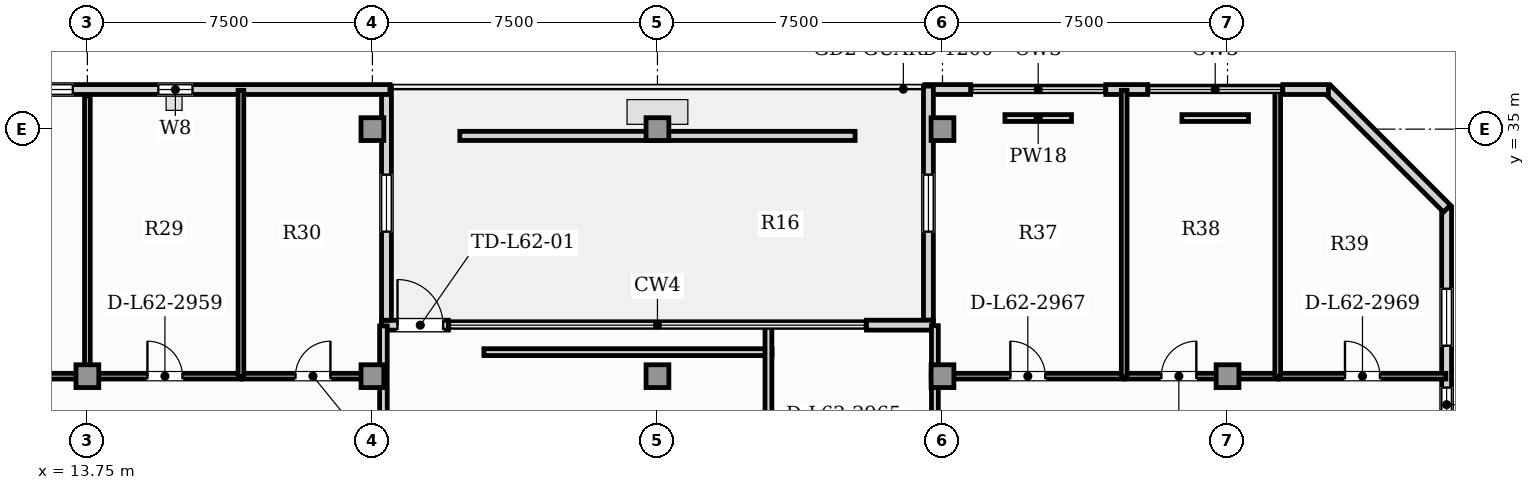
"""IFC4 building model, lengths in metres.
Left out: names, types, materials, properties, quantities, classifications, styles, units other than length and angle.
Written with IfcOpenShell. Run it as: python <this file> out.ifc"""

import sys

from ifc_helpers import new_model, si_unit, direction, frame, frame_2d, origin, origin_2d, place, context, subcontext, project, spatial, rectangle, extrude, element, fill, save


model = new_model("IFC4")
c1 = context("Model", 3, precision=1e-05, world=origin(), true_north=direction((0.0, 1.0)))
c2 = subcontext(c1, "Body", "Model", "MODEL_VIEW")
j1 = project(units=[si_unit("LENGTHUNIT", "METRE"), si_unit("PLANEANGLEUNIT", "RADIAN")], contexts=[c1])
p1 = place(None, origin())
s1 = spatial("IfcSite", under=j1, at=p1, CompositionType="ELEMENT")
p2 = place(p1, origin())
s2 = spatial("IfcBuilding", under=s1, at=p2, CompositionType="ELEMENT")
p3 = place(p2, frame((0.0, 0.0, 251.7)))
s3 = spatial("IfcBuildingStorey", under=s2, at=p3, CompositionType="ELEMENT", Elevation=251.7)
for number, where, z_axis, x_axis in (
    (1, (13.75, 28.5, 0.0), (0.0, 0.0, 1.0), (1.0, 0.0, 0.0)),
    (2, (21.25, 28.5, 0.0), (0.0, 0.0, 1.0), (1.0, 0.0, 0.0)),
    (3, (28.75, 28.5, 0.0), (0.0, 0.0, 1.0), (1.0, 0.0, 0.0)),
    (4, (36.25, 28.5, 0.0), (0.0, 0.0, 1.0), (1.0, 0.0, 0.0)),
    (5, (43.75, 28.5, 0.0), (0.0, 0.0, 1.0), (1.0, 0.0, 0.0)),
    (6, (21.25, 35.0, 0.0), (0.0, 0.0, 1.0), (1.0, 0.0, 0.0)),
    (7, (28.75, 35.0, 0.0), (0.0, 0.0, 1.0), (1.0, 0.0, 0.0)),
    (8, (36.25, 35.0, 0.0), (0.0, 0.0, 1.0), (1.0, 0.0, 0.0)),
):
    element("IfcColumn", number, at=place(p3, frame(where, z_axis=z_axis, x_axis=x_axis)), inside=s3, PredefinedType="COLUMN", context=c2, shape_type="SweptSolid", body=[
        extrude(rectangle(XDim=0.6, YDim=0.6, at=origin_2d()), origin(), (0.0, 0.0, 1.0), 5.05),
    ])
p4 = place(p3, frame((49.514, 3.24, 0.0), z_axis=(0.0, 0.0, 1.0), x_axis=(0.0, 1.0, 0.0)))
e9 = element("IfcWall", 9, at=p4, inside=s3, PredefinedType="SOLIDWALL", context=c2, shape_type="SweptSolid", body=[
    extrude(rectangle(XDim=29.692, YDim=0.26, at=frame_2d((14.846, 0.0))), origin(), (0.0, 0.0, 1.0), 4.85),
])
p5 = place(p4, frame((24.06, 0.0, 0.95)))
e10 = element("IfcOpeningElement", 10, at=p5, cuts=e9, PredefinedType="OPENING", context=c2, shape_type="SweptSolid", body=[
    extrude(rectangle(XDim=0.9, YDim=1.5, at=frame_2d((0.45, 0.75))), frame((0.0, 0.14, 0.0), z_axis=(0.0, -1.0, 0.0), x_axis=(1.0, 0.0, 0.0)), (0.0, 0.0, 1.0), 0.28),
])
p6 = place(p4, frame((10.25, 0.0, 0.9)))
e11 = element("IfcOpeningElement", 11, at=p6, cuts=e9, PredefinedType="OPENING", context=c2, shape_type="SweptSolid", body=[
    extrude(rectangle(XDim=1.5, YDim=1.95, at=frame_2d((0.75, 0.975))), frame((0.0, 0.14, 0.0), z_axis=(0.0, -1.0, 0.0), x_axis=(1.0, 0.0, 0.0)), (0.0, 0.0, 1.0), 0.28),
])
p7 = place(p4, frame((17.315, 0.0, 0.9)))
e12 = element("IfcOpeningElement", 12, at=p7, cuts=e9, PredefinedType="OPENING", context=c2, shape_type="SweptSolid", body=[
    extrude(rectangle(XDim=1.5, YDim=1.95, at=frame_2d((0.75, 0.975))), frame((0.0, 0.14, 0.0), z_axis=(0.0, -1.0, 0.0), x_axis=(1.0, 0.0, 0.0)), (0.0, 0.0, 1.0), 0.28),
])
p8 = place(p4, frame((26.061, 0.0, 0.9)))
e13 = element("IfcOpeningElement", 13, at=p8, cuts=e9, PredefinedType="OPENING", context=c2, shape_type="SweptSolid", body=[
    extrude(rectangle(XDim=1.5, YDim=1.95, at=frame_2d((0.75, 0.975))), frame((0.0, 0.14, 0.0), z_axis=(0.0, -1.0, 0.0), x_axis=(1.0, 0.0, 0.0)), (0.0, 0.0, 1.0), 0.28),
])
p9 = place(p3, frame((49.524, 32.908, 0.0), z_axis=(0.0, 0.0, 1.0), x_axis=(-0.707106781187, 0.707106781187, 0.0)))
e14 = element("IfcWall", 14, at=p9, inside=s3, PredefinedType="SOLIDWALL", context=c2, shape_type="SweptSolid", body=[
    extrude(rectangle(XDim=4.446, YDim=0.26, at=frame_2d((2.223, 0.0))), origin(), (0.0, 0.0, 1.0), 4.85),
])
p10 = place(p3, frame((46.405, 36.042, 0.0), z_axis=(0.0, 0.0, 1.0), x_axis=(-1.0, 0.0, 0.0)))
e15 = element("IfcWall", 15, at=p10, inside=s3, PredefinedType="SOLIDWALL", context=c2, shape_type="SweptSolid", body=[
    extrude(rectangle(XDim=1.2, YDim=0.26, at=frame_2d((0.6, 0.0))), origin(), (0.0, 0.0, 1.0), 4.85),
])
p11 = place(p3, frame((41.647, 36.042, 0.0), z_axis=(0.0, 0.0, 1.0), x_axis=(-1.0, 0.0, 0.0)))
e16 = element("IfcWall", 16, at=p11, inside=s3, PredefinedType="SOLIDWALL", context=c2, shape_type="SweptSolid", body=[
    extrude(rectangle(XDim=1.1, YDim=0.26, at=frame_2d((0.55, 0.0))), origin(), (0.0, 0.0, 1.0), 4.85),
])
p12 = place(p3, frame((36.99, 36.042, 0.0), z_axis=(0.0, 0.0, 1.0), x_axis=(-1.0, 0.0, 0.0)))
e17 = element("IfcWall", 17, at=p12, inside=s3, PredefinedType="SOLIDWALL", context=c2, shape_type="SweptSolid", body=[
    extrude(rectangle(XDim=1.2, YDim=0.26, at=frame_2d((0.6, 0.0))), origin(), (0.0, 0.0, 1.0), 4.85),
])
p13 = place(p3, frame((35.88, 36.132, 0.0), z_axis=(0.0, 0.0, 1.0), x_axis=(0.0, -1.0, 0.0)))
e18 = element("IfcWall", 18, at=p13, inside=s3, PredefinedType="SOLIDWALL", context=c2, shape_type="SweptSolid", body=[
    extrude(rectangle(XDim=6.16, YDim=0.26, at=frame_2d((3.08, 0.0))), origin(), (0.0, 0.0, 1.0), 4.85),
])
p14 = place(p13, frame((2.33, 0.0, 0.9)))
e19 = element("IfcOpeningElement", 19, at=p14, cuts=e18, PredefinedType="OPENING", context=c2, shape_type="SweptSolid", body=[
    extrude(rectangle(XDim=1.5, YDim=1.95, at=frame_2d((0.75, 0.975))), frame((0.0, 0.14, 0.0), z_axis=(0.0, -1.0, 0.0), x_axis=(1.0, 0.0, 0.0)), (0.0, 0.0, 1.0), 0.28),
])
p15 = place(p3, frame((21.49, 29.842, 0.0), z_axis=(0.0, 0.0, 1.0), x_axis=(1.0, 0.0, 0.0)))
e20 = element("IfcWall", 20, at=p15, inside=s3, PredefinedType="SOLIDWALL", context=c2, shape_type="SweptSolid", body=[
    extrude(rectangle(XDim=1.76, YDim=0.26, at=frame_2d((0.88, 0.0))), origin(), (0.0, 0.0, 1.0), 4.85),
])
p16 = place(p15, frame((0.42, 0.0, 0.0)))
e21 = element("IfcOpeningElement", 21, at=p16, cuts=e20, PredefinedType="OPENING", context=c2, shape_type="SweptSolid", body=[
    extrude(rectangle(XDim=1.2, YDim=2.2, at=frame_2d((0.6, 1.1))), frame((0.0, 0.14, 0.0), z_axis=(0.0, -1.0, 0.0), x_axis=(1.0, 0.0, 0.0)), (0.0, 0.0, 1.0), 0.28),
])
p17 = place(p3, frame((34.25, 29.842, 0.0), z_axis=(0.0, 0.0, 1.0), x_axis=(1.0, 0.0, 0.0)))
e22 = element("IfcWall", 22, at=p17, inside=s3, PredefinedType="SOLIDWALL", context=c2, shape_type="SweptSolid", body=[
    extrude(rectangle(XDim=1.76, YDim=0.26, at=frame_2d((0.88, 0.0))), origin(), (0.0, 0.0, 1.0), 4.85),
])
p18 = place(p3, frame((21.62, 29.972, 0.0), z_axis=(0.0, 0.0, 1.0), x_axis=(0.0, 1.0, 0.0)))
e23 = element("IfcWall", 23, at=p18, inside=s3, PredefinedType="SOLIDWALL", context=c2, shape_type="SweptSolid", body=[
    extrude(rectangle(XDim=6.16, YDim=0.26, at=frame_2d((3.08, 0.0))), origin(), (0.0, 0.0, 1.0), 4.85),
])
p19 = place(p18, frame((2.33, 0.0, 0.9)))
e24 = element("IfcOpeningElement", 24, at=p19, cuts=e23, PredefinedType="OPENING", context=c2, shape_type="SweptSolid", body=[
    extrude(rectangle(XDim=1.5, YDim=1.95, at=frame_2d((0.75, 0.975))), frame((0.0, 0.14, 0.0), z_axis=(0.0, -1.0, 0.0), x_axis=(1.0, 0.0, 0.0)), (0.0, 0.0, 1.0), 0.28),
])
p20 = place(p3, frame((21.71, 36.042, 0.0), z_axis=(0.0, 0.0, 1.0), x_axis=(-1.0, 0.0, 0.0)))
e25 = element("IfcWall", 25, at=p20, inside=s3, PredefinedType="SOLIDWALL", context=c2, shape_type="SweptSolid", body=[
    extrude(rectangle(XDim=10.615, YDim=0.26, at=frame_2d((5.307, 0.0))), origin(), (0.0, 0.0, 1.0), 4.85),
])
p21 = place(p20, frame((8.344, 0.0, 0.9)))
e26 = element("IfcOpeningElement", 26, at=p21, cuts=e25, PredefinedType="OPENING", context=c2, shape_type="SweptSolid", body=[
    extrude(rectangle(XDim=1.5, YDim=1.95, at=frame_2d((0.75, 0.975))), frame((0.0, 0.14, 0.0), z_axis=(0.0, -1.0, 0.0), x_axis=(1.0, 0.0, 0.0)), (0.0, 0.0, 1.0), 0.28),
])
p22 = place(p20, frame((5.194, 0.0, 0.9)))
e27 = element("IfcOpeningElement", 27, at=p22, cuts=e25, PredefinedType="OPENING", context=c2, shape_type="SweptSolid", body=[
    extrude(rectangle(XDim=0.9, YDim=1.4, at=frame_2d((0.45, 0.7))), frame((0.0, 0.14, 0.0), z_axis=(0.0, -1.0, 0.0), x_axis=(1.0, 0.0, 0.0)), (0.0, 0.0, 1.0), 0.28),
])
p23 = place(p3, frame((23.55, 34.822, 0.0), z_axis=(0.0, 0.0, 1.0), x_axis=(1.0, 0.0, 0.0)))
e28 = element("IfcWall", 28, at=p23, inside=s3, PredefinedType="PARAPET", context=c2, shape_type="SweptSolid", body=[
    extrude(rectangle(XDim=10.4, YDim=0.24, at=frame_2d((5.2, 0.0))), origin(), (0.0, 0.0, 1.0), 0.55),
])
p24 = place(p3, frame((21.54, 26.995, 0.0), z_axis=(0.0, 0.0, 1.0), x_axis=(0.0, 1.0, 0.0)))
e29 = element("IfcWall", 29, at=p24, inside=s3, PredefinedType="PARTITIONING", context=c2, shape_type="SweptSolid", body=[
    extrude(rectangle(XDim=2.827, YDim=0.2, at=frame_2d((1.414, 0.0))), origin(), (0.0, 0.0, 1.0), 4.85),
])
p25 = place(p3, frame((8.005, 28.5, 0.0), z_axis=(0.0, 0.0, 1.0), x_axis=(1.0, 0.0, 0.0)))
e30 = element("IfcWall", 30, at=p25, inside=s3, PredefinedType="PARTITIONING", context=c2, shape_type="SweptSolid", body=[
    extrude(rectangle(XDim=5.75, YDim=0.15, at=frame_2d((2.875, 0.0))), origin(), (0.0, 0.0, 1.0), 4.85),
])
p26 = place(p25, frame((2.415, 0.0, 0.0)))
e31 = element("IfcOpeningElement", 31, at=p26, cuts=e30, PredefinedType="OPENING", context=c2, shape_type="SweptSolid", body=[
    extrude(rectangle(XDim=0.92, YDim=2.1, at=frame_2d((0.46, 1.05))), frame((0.0, 0.085, 0.0), z_axis=(0.0, -1.0, 0.0), x_axis=(1.0, 0.0, 0.0)), (0.0, 0.0, 1.0), 0.17),
])
p27 = place(p3, frame((13.785, 28.5, 0.0), z_axis=(0.0, 0.0, 1.0), x_axis=(1.0, 0.0, 0.0)))
e32 = element("IfcWall", 32, at=p27, inside=s3, PredefinedType="PARTITIONING", context=c2, shape_type="SweptSolid", body=[
    extrude(rectangle(XDim=4.011, YDim=0.15, at=frame_2d((2.005, 0.0))), origin(), (0.0, 0.0, 1.0), 4.306),
])
p28 = place(p27, frame((1.545, 0.0, 0.0)))
e33 = element("IfcOpeningElement", 33, at=p28, cuts=e32, PredefinedType="OPENING", context=c2, shape_type="SweptSolid", body=[
    extrude(rectangle(XDim=0.92, YDim=2.1, at=frame_2d((0.46, 1.05))), frame((0.0, 0.085, 0.0), z_axis=(0.0, -1.0, 0.0), x_axis=(1.0, 0.0, 0.0)), (0.0, 0.0, 1.0), 0.17),
])
p29 = place(p3, frame((17.826, 28.5, 0.0), z_axis=(0.0, 0.0, 1.0), x_axis=(1.0, 0.0, 0.0)))
e34 = element("IfcWall", 34, at=p29, inside=s3, PredefinedType="PARTITIONING", context=c2, shape_type="SweptSolid", body=[
    extrude(rectangle(XDim=3.719, YDim=0.15, at=frame_2d((1.86, 0.0))), origin(), (0.0, 0.0, 1.0), 4.306),
])
p30 = place(p29, frame((1.4, 0.0, 0.0)))
e35 = element("IfcOpeningElement", 35, at=p30, cuts=e34, PredefinedType="OPENING", context=c2, shape_type="SweptSolid", body=[
    extrude(rectangle(XDim=0.92, YDim=2.1, at=frame_2d((0.46, 1.05))), frame((0.0, 0.085, 0.0), z_axis=(0.0, -1.0, 0.0), x_axis=(1.0, 0.0, 0.0)), (0.0, 0.0, 1.0), 0.17),
])
p31 = place(p3, frame((13.75, 28.495, 0.0), z_axis=(0.0, 0.0, 1.0), x_axis=(0.0, 1.0, 0.0)))
e36 = element("IfcWall", 36, at=p31, inside=s3, PredefinedType="PARTITIONING", context=c2, shape_type="SweptSolid", body=[
    extrude(rectangle(XDim=7.378, YDim=0.15, at=frame_2d((3.689, 0.0))), origin(), (0.0, 0.0, 1.0), 4.85),
])
p32 = place(p3, frame((17.791, 28.495, 0.0), z_axis=(0.0, 0.0, 1.0), x_axis=(0.0, 1.0, 0.0)))
e37 = element("IfcWall", 37, at=p32, inside=s3, PredefinedType="PARTITIONING", context=c2, shape_type="SweptSolid", body=[
    extrude(rectangle(XDim=7.527, YDim=0.15, at=frame_2d((3.764, 0.0))), origin(), (0.0, 0.0, 1.0), 4.85),
])
p33 = place(p3, frame((35.955, 28.5, 0.0), z_axis=(0.0, 0.0, 1.0), x_axis=(1.0, 0.0, 0.0)))
e38 = element("IfcWall", 38, at=p33, inside=s3, PredefinedType="PARTITIONING", context=c2, shape_type="SweptSolid", body=[
    extrude(rectangle(XDim=5.08, YDim=0.15, at=frame_2d((2.54, 0.0))), origin(), (0.0, 0.0, 1.0), 4.306),
])
p34 = place(p33, frame((2.08, 0.0, 0.0)))
e39 = element("IfcOpeningElement", 39, at=p34, cuts=e38, PredefinedType="OPENING", context=c2, shape_type="SweptSolid", body=[
    extrude(rectangle(XDim=0.92, YDim=2.1, at=frame_2d((0.46, 1.05))), frame((0.0, 0.085, 0.0), z_axis=(0.0, -1.0, 0.0), x_axis=(1.0, 0.0, 0.0)), (0.0, 0.0, 1.0), 0.17),
])
p35 = place(p3, frame((41.065, 28.5, 0.0), z_axis=(0.0, 0.0, 1.0), x_axis=(1.0, 0.0, 0.0)))
e40 = element("IfcWall", 40, at=p35, inside=s3, PredefinedType="PARTITIONING", context=c2, shape_type="SweptSolid", body=[
    extrude(rectangle(XDim=4.011, YDim=0.15, at=frame_2d((2.005, 0.0))), origin(), (0.0, 0.0, 1.0), 4.306),
])
p36 = place(p35, frame((0.944, 0.0, 0.0)))
e41 = element("IfcOpeningElement", 41, at=p36, cuts=e40, PredefinedType="OPENING", context=c2, shape_type="SweptSolid", body=[
    extrude(rectangle(XDim=0.92, YDim=2.1, at=frame_2d((0.46, 1.05))), frame((0.0, 0.085, 0.0), z_axis=(0.0, -1.0, 0.0), x_axis=(1.0, 0.0, 0.0)), (0.0, 0.0, 1.0), 0.17),
])
p37 = place(p3, frame((45.106, 28.5, 0.0), z_axis=(0.0, 0.0, 1.0), x_axis=(1.0, 0.0, 0.0)))
e42 = element("IfcWall", 42, at=p37, inside=s3, PredefinedType="PARTITIONING", context=c2, shape_type="SweptSolid", body=[
    extrude(rectangle(XDim=4.389, YDim=0.15, at=frame_2d((2.194, 0.0))), origin(), (0.0, 0.0, 1.0), 4.85),
])
p38 = place(p37, frame((1.734, 0.0, 0.0)))
e43 = element("IfcOpeningElement", 43, at=p38, cuts=e42, PredefinedType="OPENING", context=c2, shape_type="SweptSolid", body=[
    extrude(rectangle(XDim=0.92, YDim=2.1, at=frame_2d((0.46, 1.05))), frame((0.0, 0.085, 0.0), z_axis=(0.0, -1.0, 0.0), x_axis=(1.0, 0.0, 0.0)), (0.0, 0.0, 1.0), 0.17),
])
p39 = place(p3, frame((41.03, 28.495, 0.0), z_axis=(0.0, 0.0, 1.0), x_axis=(0.0, 1.0, 0.0)))
e44 = element("IfcWall", 44, at=p39, inside=s3, PredefinedType="PARTITIONING", context=c2, shape_type="SweptSolid", body=[
    extrude(rectangle(XDim=7.527, YDim=0.15, at=frame_2d((3.764, 0.0))), origin(), (0.0, 0.0, 1.0), 4.85),
])
p40 = place(p3, frame((45.071, 28.495, 0.0), z_axis=(0.0, 0.0, 1.0), x_axis=(0.0, 1.0, 0.0)))
e45 = element("IfcWall", 45, at=p40, inside=s3, PredefinedType="PARTITIONING", context=c2, shape_type="SweptSolid", body=[
    extrude(rectangle(XDim=7.553, YDim=0.15, at=frame_2d((3.776, 0.0))), origin(), (0.0, 0.0, 1.0), 4.85),
])
p41 = place(p3, frame((24.183, 29.132, 0.0), z_axis=(0.0, 0.0, 1.0), x_axis=(1.0, 0.0, 0.0)))
e46 = element("IfcWall", 46, at=p41, inside=s3, PredefinedType="PARTITIONING", context=c2, shape_type="SweptSolid", body=[
    extrude(rectangle(XDim=7.582, YDim=0.18, at=frame_2d((3.791, 0.0))), origin(), (0.0, 0.0, 1.0), 4.85),
])
p42 = place(p3, frame((31.67, 29.824, 0.0), z_axis=(0.0, 0.0, 1.0), x_axis=(0.0, -1.0, 0.0)))
e47 = element("IfcWall", 47, at=p42, inside=s3, PredefinedType="PARTITIONING", context=c2, shape_type="SweptSolid", body=[
    extrude(rectangle(XDim=11.995, YDim=0.18, at=frame_2d((5.998, 0.0))), origin(), (0.0, 0.0, 1.0), 4.85),
])
p43 = place(p3, frame((36.05, 27.325, 0.0), z_axis=(0.0, 0.0, 1.0), x_axis=(0.0, 1.0, 0.0)))
e48 = element("IfcWall", 48, at=p43, inside=s3, PredefinedType="PARTITIONING", context=c2, shape_type="SweptSolid", body=[
    extrude(rectangle(XDim=2.504, YDim=0.18, at=frame_2d((1.252, 0.0))), origin(), (0.0, 0.0, 1.0), 4.85),
])
for number, where, z_axis, x_axis in (
    (49, (37.893, 35.292, 0.0), (0.0, 0.0, 1.0), (1.0, 0.0, 0.0)),
    (50, (42.55, 35.292, 0.0), (0.0, 0.0, 1.0), (1.0, 0.0, 0.0)),
):
    element("IfcWall", number, at=place(p3, frame(where, z_axis=z_axis, x_axis=x_axis)), inside=s3, PredefinedType="PARTITIONING", context=c2, shape_type="SweptSolid", body=[
        extrude(rectangle(XDim=1.751, YDim=0.18, at=frame_2d((0.875, 0.0))), origin(), (0.0, 0.0, 1.0), 4.85),
    ])
p44 = place(p16, origin())
e51 = element("IfcDoor", 51, at=p44, inside=s3, OperationType="SINGLE_SWING_LEFT", PredefinedType="DOOR", context=c2, shape_type="SweptSolid", body=[
    extrude(rectangle(XDim=1.2, YDim=2.2, at=frame_2d((0.6, 1.1))), frame((0.0, 0.025, 0.0), z_axis=(0.0, -1.0, 0.0), x_axis=(1.0, 0.0, 0.0)), (0.0, 0.0, 1.0), 0.05),
])
fill(e21, e51)
p45 = place(p21, origin())
e52 = element("IfcWindow", 52, at=p45, inside=s3, PartitioningType="SINGLE_PANEL", PredefinedType="WINDOW", context=c2, shape_type="SweptSolid", body=[
    extrude(rectangle(XDim=1.5, YDim=1.95, at=frame_2d((0.75, 0.975))), frame((0.0, 0.03, 0.0), z_axis=(0.0, -1.0, 0.0), x_axis=(1.0, 0.0, 0.0)), (0.0, 0.0, 1.0), 0.06),
])
fill(e26, e52)
p46 = place(p22, origin())
e53 = element("IfcWindow", 53, at=p46, inside=s3, PartitioningType="SINGLE_PANEL", PredefinedType="WINDOW", context=c2, shape_type="SweptSolid", body=[
    extrude(rectangle(XDim=0.9, YDim=1.4, at=frame_2d((0.45, 0.7))), frame((0.0, 0.03, 0.0), z_axis=(0.0, -1.0, 0.0), x_axis=(1.0, 0.0, 0.0)), (0.0, 0.0, 1.0), 0.06),
])
fill(e27, e53)
p47 = place(p19, origin())
e54 = element("IfcWindow", 54, at=p47, inside=s3, PartitioningType="SINGLE_PANEL", PredefinedType="WINDOW", context=c2, shape_type="SweptSolid", body=[
    extrude(rectangle(XDim=1.5, YDim=1.95, at=frame_2d((0.75, 0.975))), frame((0.0, 0.03, 0.0), z_axis=(0.0, -1.0, 0.0), x_axis=(1.0, 0.0, 0.0)), (0.0, 0.0, 1.0), 0.06),
])
fill(e24, e54)
p48 = place(p5, origin())
e55 = element("IfcWindow", 55, at=p48, inside=s3, PartitioningType="SINGLE_PANEL", PredefinedType="WINDOW", context=c2, shape_type="SweptSolid", body=[
    extrude(rectangle(XDim=0.9, YDim=1.5, at=frame_2d((0.45, 0.75))), frame((0.0, 0.03, 0.0), z_axis=(0.0, -1.0, 0.0), x_axis=(1.0, 0.0, 0.0)), (0.0, 0.0, 1.0), 0.06),
])
fill(e10, e55)
p49 = place(p14, origin())
e56 = element("IfcWindow", 56, at=p49, inside=s3, PartitioningType="SINGLE_PANEL", PredefinedType="WINDOW", context=c2, shape_type="SweptSolid", body=[
    extrude(rectangle(XDim=1.5, YDim=1.95, at=frame_2d((0.75, 0.975))), frame((0.0, 0.03, 0.0), z_axis=(0.0, -1.0, 0.0), x_axis=(1.0, 0.0, 0.0)), (0.0, 0.0, 1.0), 0.06),
])
fill(e19, e56)
p50 = place(p8, origin())
e57 = element("IfcWindow", 57, at=p50, inside=s3, PartitioningType="SINGLE_PANEL", PredefinedType="WINDOW", context=c2, shape_type="SweptSolid", body=[
    extrude(rectangle(XDim=1.5, YDim=1.95, at=frame_2d((0.75, 0.975))), frame((0.0, 0.03, 0.0), z_axis=(0.0, -1.0, 0.0), x_axis=(1.0, 0.0, 0.0)), (0.0, 0.0, 1.0), 0.06),
])
fill(e13, e57)
p51 = place(p28, origin())
e58 = element("IfcDoor", 58, at=p51, inside=s3, OperationType="SINGLE_SWING_LEFT", PredefinedType="DOOR", context=c2, shape_type="SweptSolid", body=[
    extrude(rectangle(XDim=0.92, YDim=2.1, at=frame_2d((0.46, 1.05))), frame((0.0, 0.025, 0.0), z_axis=(0.0, -1.0, 0.0), x_axis=(1.0, 0.0, 0.0)), (0.0, 0.0, 1.0), 0.05),
])
fill(e33, e58)
p52 = place(p30, origin())
e59 = element("IfcDoor", 59, at=p52, inside=s3, OperationType="SINGLE_SWING_RIGHT", PredefinedType="DOOR", context=c2, shape_type="SweptSolid", body=[
    extrude(rectangle(XDim=0.92, YDim=2.1, at=frame_2d((0.46, 1.05))), frame((0.0, 0.025, 0.0), z_axis=(0.0, -1.0, 0.0), x_axis=(1.0, 0.0, 0.0)), (0.0, 0.0, 1.0), 0.05),
])
fill(e35, e59)
p53 = place(p34, origin())
e60 = element("IfcDoor", 60, at=p53, inside=s3, OperationType="SINGLE_SWING_LEFT", PredefinedType="DOOR", context=c2, shape_type="SweptSolid", body=[
    extrude(rectangle(XDim=0.92, YDim=2.1, at=frame_2d((0.46, 1.05))), frame((0.0, 0.025, 0.0), z_axis=(0.0, -1.0, 0.0), x_axis=(1.0, 0.0, 0.0)), (0.0, 0.0, 1.0), 0.05),
])
fill(e39, e60)
p54 = place(p36, origin())
e61 = element("IfcDoor", 61, at=p54, inside=s3, OperationType="SINGLE_SWING_RIGHT", PredefinedType="DOOR", context=c2, shape_type="SweptSolid", body=[
    extrude(rectangle(XDim=0.92, YDim=2.1, at=frame_2d((0.46, 1.05))), frame((0.0, 0.025, 0.0), z_axis=(0.0, -1.0, 0.0), x_axis=(1.0, 0.0, 0.0)), (0.0, 0.0, 1.0), 0.05),
])
fill(e41, e61)
p55 = place(p38, origin())
e62 = element("IfcDoor", 62, at=p55, inside=s3, OperationType="SINGLE_SWING_LEFT", PredefinedType="DOOR", context=c2, shape_type="SweptSolid", body=[
    extrude(rectangle(XDim=0.92, YDim=2.1, at=frame_2d((0.46, 1.05))), frame((0.0, 0.025, 0.0), z_axis=(0.0, -1.0, 0.0), x_axis=(1.0, 0.0, 0.0)), (0.0, 0.0, 1.0), 0.05),
])
fill(e43, e62)
save(model, sys.argv[1])
